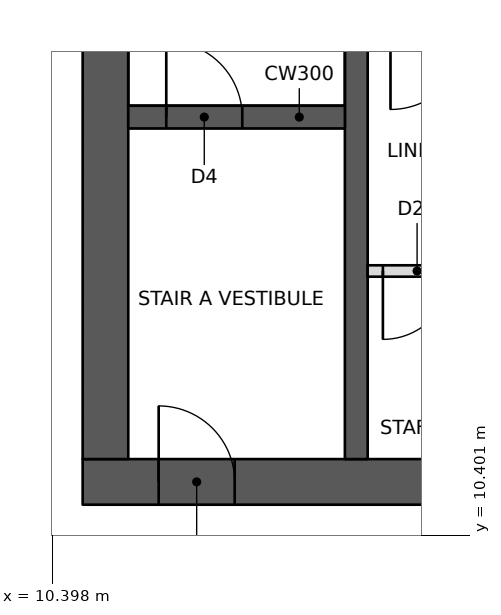
"""IFC4 building model, lengths in metres.
Left out: names, types, materials, properties, quantities, classifications, styles, units other than length and angle.
Written with IfcOpenShell. Run it as: python <this file> out.ifc"""

import sys

from ifc_helpers import new_model, si_unit, direction, frame, frame_2d, origin, place, context, subcontext, project, spatial, rectangle, extrude, element, fill, save


model = new_model("IFC4")
c1 = context("Model", 3, precision=1e-05, world=origin(), true_north=direction((0.0, 1.0)))
c2 = subcontext(c1, "Body", "Model", "MODEL_VIEW")
j1 = project(units=[si_unit("LENGTHUNIT", "METRE"), si_unit("PLANEANGLEUNIT", "RADIAN")], contexts=[c1])
p1 = place(None, origin())
s1 = spatial("IfcSite", under=j1, at=p1, CompositionType="ELEMENT")
p2 = place(p1, origin())
s2 = spatial("IfcBuilding", under=s1, at=p2, CompositionType="ELEMENT")
p3 = place(p2, frame((0.0, 0.0, 167.2)))
s3 = spatial("IfcBuildingStorey", under=s2, at=p3, CompositionType="ELEMENT", Elevation=167.2)
p4 = place(p3, frame((10.8, 11.1, 0.0), z_axis=(0.0, 0.0, 1.0), x_axis=(1.0, 0.0, 0.0)))
e1 = element("IfcWall", 1, at=p4, inside=s3, PredefinedType="SHEAR", context=c2, shape_type="SweptSolid", body=[
    extrude(rectangle(XDim=23.4, YDim=0.6, at=frame_2d((11.7, 0.0))), origin(), (0.0, 0.0, 1.0), 3.4),
])
p5 = place(p4, frame((1.0, 0.0, 0.0)))
e2 = element("IfcOpeningElement", 2, at=p5, cuts=e1, PredefinedType="OPENING", context=c2, shape_type="SweptSolid", body=[
    extrude(rectangle(XDim=1.0, YDim=2.1, at=frame_2d((0.5, 1.05))), frame((0.0, 0.31, 0.0), z_axis=(0.0, -1.0, 0.0), x_axis=(1.0, 0.0, 0.0)), (0.0, 0.0, 1.0), 0.62),
])
p6 = place(p4, frame((17.2, 0.0, 0.0)))
e3 = element("IfcOpeningElement", 3, at=p6, cuts=e1, PredefinedType="OPENING", context=c2, shape_type="SweptSolid", body=[
    extrude(rectangle(XDim=1.8, YDim=2.1, at=frame_2d((0.9, 1.05))), frame((0.0, 0.31, 0.0), z_axis=(0.0, -1.0, 0.0), x_axis=(1.0, 0.0, 0.0)), (0.0, 0.0, 1.0), 0.62),
])
p7 = place(p3, frame((11.1, 11.4, 0.0), z_axis=(0.0, 0.0, 1.0), x_axis=(0.0, 1.0, 0.0)))
e4 = element("IfcWall", 4, at=p7, inside=s3, PredefinedType="SHEAR", context=c2, shape_type="SweptSolid", body=[
    extrude(rectangle(XDim=13.2, YDim=0.6, at=frame_2d((6.6, 0.0))), origin(), (0.0, 0.0, 1.0), 3.4),
])
p8 = place(p3, frame((14.4, 11.4, 0.0), z_axis=(0.0, 0.0, 1.0), x_axis=(0.0, 1.0, 0.0)))
e5 = element("IfcWall", 5, at=p8, inside=s3, PredefinedType="SHEAR", context=c2, shape_type="SweptSolid", body=[
    extrude(rectangle(XDim=13.2, YDim=0.3, at=frame_2d((6.6, 0.0))), origin(), (0.0, 0.0, 1.0), 3.4),
])
p9 = place(p3, frame((11.4, 15.9, 0.0), z_axis=(0.0, 0.0, 1.0), x_axis=(1.0, 0.0, 0.0)))
e6 = element("IfcWall", 6, at=p9, inside=s3, PredefinedType="SHEAR", context=c2, shape_type="SweptSolid", body=[
    extrude(rectangle(XDim=2.85, YDim=0.3, at=frame_2d((1.425, 0.0))), origin(), (0.0, 0.0, 1.0), 3.4),
])
p10 = place(p9, frame((0.5, 0.0, 0.0)))
e7 = element("IfcOpeningElement", 7, at=p10, cuts=e6, PredefinedType="OPENING", context=c2, shape_type="SweptSolid", body=[
    extrude(rectangle(XDim=1.0, YDim=2.1, at=frame_2d((0.5, 1.05))), frame((0.0, 0.16, 0.0), z_axis=(0.0, -1.0, 0.0), x_axis=(1.0, 0.0, 0.0)), (0.0, 0.0, 1.0), 0.32),
])
p11 = place(p3, frame((14.55, 13.875, 0.0), z_axis=(0.0, 0.0, 1.0), x_axis=(1.0, 0.0, 0.0)))
e8 = element("IfcWall", 8, at=p11, inside=s3, PredefinedType="PARTITIONING", context=c2, shape_type="SweptSolid", body=[
    extrude(rectangle(XDim=3.3, YDim=0.15, at=frame_2d((1.65, 0.0))), origin(), (0.0, 0.0, 1.0), 3.2),
])
p12 = place(p11, frame((0.2, 0.0, 0.0)))
e9 = element("IfcOpeningElement", 9, at=p12, cuts=e8, PredefinedType="OPENING", context=c2, shape_type="SweptSolid", body=[
    extrude(rectangle(XDim=0.9, YDim=2.1, at=frame_2d((0.45, 1.05))), frame((0.0, 0.085, 0.0), z_axis=(0.0, -1.0, 0.0), x_axis=(1.0, 0.0, 0.0)), (0.0, 0.0, 1.0), 0.17),
])
p13 = place(p11, frame((1.8, 0.0, 0.0)))
e10 = element("IfcOpeningElement", 10, at=p13, cuts=e8, PredefinedType="OPENING", context=c2, shape_type="SweptSolid", body=[
    extrude(rectangle(XDim=0.9, YDim=2.1, at=frame_2d((0.45, 1.05))), frame((0.0, 0.085, 0.0), z_axis=(0.0, -1.0, 0.0), x_axis=(1.0, 0.0, 0.0)), (0.0, 0.0, 1.0), 0.17),
])
p14 = place(p12, frame((0.9, 0.0, 0.0), z_axis=(0.0, 0.0, 1.0), x_axis=(-1.0, 0.0, 0.0)))
e11 = element("IfcDoor", 11, at=p14, inside=s3, OperationType="SINGLE_SWING_RIGHT", PredefinedType="DOOR", context=c2, shape_type="SweptSolid", body=[
    extrude(rectangle(XDim=0.9, YDim=2.1, at=frame_2d((0.45, 1.05))), frame((0.0, 0.025, 0.0), z_axis=(0.0, -1.0, 0.0), x_axis=(1.0, 0.0, 0.0)), (0.0, 0.0, 1.0), 0.05),
])
fill(e9, e11)
p15 = place(p5, origin())
e12 = element("IfcDoor", 12, at=p15, inside=s3, OperationType="SINGLE_SWING_LEFT", PredefinedType="DOOR", context=c2, shape_type="SweptSolid", body=[
    extrude(rectangle(XDim=1.0, YDim=2.1, at=frame_2d((0.5, 1.05))), frame((0.0, 0.025, 0.0), z_axis=(0.0, -1.0, 0.0), x_axis=(1.0, 0.0, 0.0)), (0.0, 0.0, 1.0), 0.05),
])
fill(e2, e12)
p16 = place(p10, origin())
e13 = element("IfcDoor", 13, at=p16, inside=s3, OperationType="SINGLE_SWING_LEFT", PredefinedType="DOOR", context=c2, shape_type="SweptSolid", body=[
    extrude(rectangle(XDim=1.0, YDim=2.1, at=frame_2d((0.5, 1.05))), frame((0.0, 0.025, 0.0), z_axis=(0.0, -1.0, 0.0), x_axis=(1.0, 0.0, 0.0)), (0.0, 0.0, 1.0), 0.05),
])
fill(e7, e13)
save(model, sys.argv[1])
